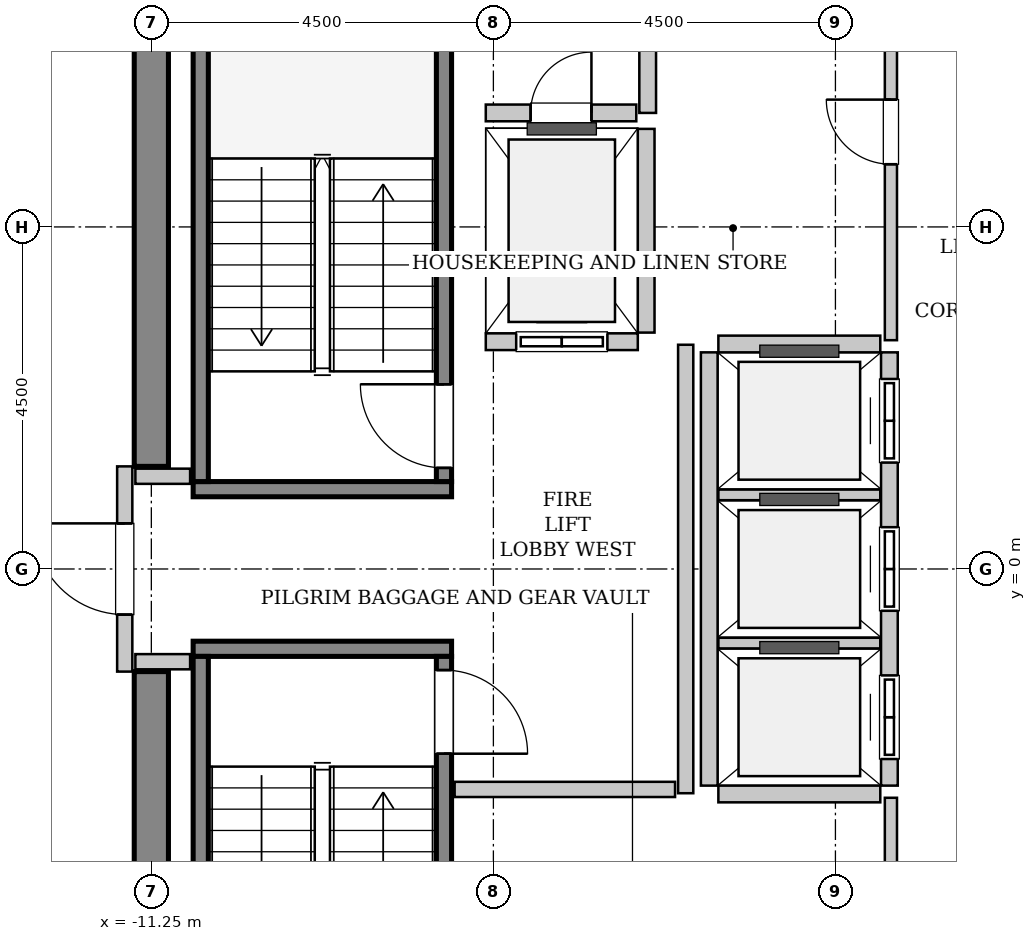
"""IFC4 building model, lengths in metres.
Left out: names, types, materials, properties, quantities, classifications, styles, units other than length and angle.
Written with IfcOpenShell. Run it as: python <this file> out.ifc"""

import sys

from ifc_helpers import new_model, si_unit, direction, frame, frame_2d, origin, place, context, subcontext, project, spatial, rectangle, extrude, source, transform, mapped, element, fill, save


model = new_model("IFC4")
c1 = context("Model", 3, precision=1e-05, world=origin(), true_north=direction((0.0, 1.0)))
c2 = subcontext(c1, "Body", "Model", "MODEL_VIEW")
j1 = project(units=[si_unit("LENGTHUNIT", "METRE"), si_unit("PLANEANGLEUNIT", "RADIAN")], contexts=[c1])
p1 = place(None, origin())
s1 = spatial("IfcSite", under=j1, at=p1, CompositionType="ELEMENT")
p2 = place(p1, origin())
s2 = spatial("IfcBuilding", under=s1, at=p2, CompositionType="ELEMENT")
p3 = place(p2, frame((0.0, 0.0, 302.6)))
s3 = spatial("IfcBuildingStorey", under=s2, at=p3, CompositionType="ELEMENT", Elevation=302.6)
m1 = source(origin(), c2, "Body", "SweptSolid", [
    extrude(rectangle(XDim=7.425, YDim=0.45, at=frame_2d((3.712, 0.0))), origin(), (0.0, 0.0, 1.0), 3.8),
])
for number, where, z_axis, x_axis in (
    (1, (-11.25, -8.775, 0.0), (0.0, 0.0, 1.0), (0.0, 1.0, 0.0)),
    (2, (-11.25, 1.35, 0.0), (0.0, 0.0, 1.0), (0.0, 1.0, 0.0)),
):
    element("IfcWall", number, at=place(p3, frame(where, z_axis=z_axis, x_axis=x_axis)), inside=s3, PredefinedType="SHEAR", context=c2, shape_type="MappedRepresentation", body=[
        mapped(m1, transform((0.0, 0.0, 0.0), x_axis=(1.0, 0.0, 0.0), y_axis=(0.0, 1.0, 0.0), z_axis=(0.0, 0.0, 1.0), scale=1.0)),
    ])
m2 = source(origin(), c2, "Body", "SweptSolid", [
    extrude(rectangle(XDim=3.4, YDim=0.2, at=frame_2d((1.7, 0.0))), origin(), (0.0, 0.0, 1.0), 3.8),
])
p4 = place(p3, frame((-7.3, 1.05, 0.0), z_axis=(0.0, 0.0, 1.0), x_axis=(-1.0, 0.0, 0.0)))
e3 = element("IfcWall", 3, at=p4, inside=s3, PredefinedType="SOLIDWALL", context=c2, shape_type="MappedRepresentation", body=[
    mapped(m2, transform((0.0, 0.0, 0.0), x_axis=(1.0, 0.0, 0.0), y_axis=(0.0, 1.0, 0.0), z_axis=(0.0, 0.0, 1.0), scale=1.0)),
])
m3 = source(origin(), c2, "Body", "SweptSolid", [
    extrude(rectangle(XDim=7.1, YDim=0.2, at=frame_2d((3.55, 0.0))), origin(), (0.0, 0.0, 1.0), 3.8),
])
p5 = place(p3, frame((-7.4, 1.15, 0.0), z_axis=(0.0, 0.0, 1.0), x_axis=(0.0, 1.0, 0.0)))
e4 = element("IfcWall", 4, at=p5, inside=s3, PredefinedType="SOLIDWALL", context=c2, shape_type="MappedRepresentation", body=[
    mapped(m3, transform((0.0, 0.0, 0.0), x_axis=(1.0, 0.0, 0.0), y_axis=(0.0, 1.0, 0.0), z_axis=(0.0, 0.0, 1.0), scale=1.0)),
])
p6 = place(p5, frame((0.18, 0.0, 0.0)))
e5 = element("IfcOpeningElement", 5, at=p6, cuts=e4, PredefinedType="OPENING", context=c2, shape_type="SweptSolid", body=[
    extrude(rectangle(XDim=1.1, YDim=2.15, at=frame_2d((0.55, 1.075))), frame((0.0, 0.11, 0.0), z_axis=(0.0, -1.0, 0.0), x_axis=(1.0, 0.0, 0.0)), (0.0, 0.0, 1.0), 0.22),
])
p7 = place(p3, frame((-10.6, 1.15, 0.0), z_axis=(0.0, 0.0, 1.0), x_axis=(0.0, 1.0, 0.0)))
e6 = element("IfcWall", 6, at=p7, inside=s3, PredefinedType="SOLIDWALL", context=c2, shape_type="MappedRepresentation", body=[
    mapped(m3, transform((0.0, 0.0, 0.0), x_axis=(1.0, 0.0, 0.0), y_axis=(0.0, 1.0, 0.0), z_axis=(0.0, 0.0, 1.0), scale=1.0)),
])
p8 = place(p3, frame((-10.7, -1.05, 0.0), z_axis=(0.0, 0.0, 1.0), x_axis=(1.0, 0.0, 0.0)))
e7 = element("IfcWall", 7, at=p8, inside=s3, PredefinedType="SOLIDWALL", context=c2, shape_type="MappedRepresentation", body=[
    mapped(m2, transform((0.0, 0.0, 0.0), x_axis=(1.0, 0.0, 0.0), y_axis=(0.0, 1.0, 0.0), z_axis=(0.0, 0.0, 1.0), scale=1.0)),
])
p9 = place(p3, frame((-10.6, -1.15, 0.0), z_axis=(0.0, 0.0, 1.0), x_axis=(0.0, -1.0, 0.0)))
e8 = element("IfcWall", 8, at=p9, inside=s3, PredefinedType="SOLIDWALL", context=c2, shape_type="MappedRepresentation", body=[
    mapped(m3, transform((0.0, 0.0, 0.0), x_axis=(1.0, 0.0, 0.0), y_axis=(0.0, 1.0, 0.0), z_axis=(0.0, 0.0, 1.0), scale=1.0)),
])
p10 = place(p3, frame((-7.4, -1.15, 0.0), z_axis=(0.0, 0.0, 1.0), x_axis=(0.0, -1.0, 0.0)))
e9 = element("IfcWall", 9, at=p10, inside=s3, PredefinedType="SOLIDWALL", context=c2, shape_type="MappedRepresentation", body=[
    mapped(m3, transform((0.0, 0.0, 0.0), x_axis=(1.0, 0.0, 0.0), y_axis=(0.0, 1.0, 0.0), z_axis=(0.0, 0.0, 1.0), scale=1.0)),
])
p11 = place(p10, frame((0.18, 0.0, 0.0)))
e10 = element("IfcOpeningElement", 10, at=p11, cuts=e9, PredefinedType="OPENING", context=c2, shape_type="SweptSolid", body=[
    extrude(rectangle(XDim=1.1, YDim=2.15, at=frame_2d((0.55, 1.075))), frame((0.0, 0.11, 0.0), z_axis=(0.0, -1.0, 0.0), x_axis=(1.0, 0.0, 0.0)), (0.0, 0.0, 1.0), 0.22),
])
m4 = source(origin(), c2, "Body", "SweptSolid", [
    extrude(rectangle(XDim=2.0, YDim=0.22, at=frame_2d((1.0, 0.0))), origin(), (0.0, 0.0, 1.0), 3.535),
])
p12 = place(p3, frame((-6.85, 2.99, 0.0), z_axis=(0.0, 0.0, 1.0), x_axis=(1.0, 0.0, 0.0)))
e11 = element("IfcWall", 11, at=p12, inside=s3, PredefinedType="SOLIDWALL", context=c2, shape_type="MappedRepresentation", body=[
    mapped(m4, transform((0.0, 0.0, 0.0), x_axis=(1.0, 0.0, 0.0), y_axis=(0.0, 1.0, 0.0), z_axis=(0.0, 0.0, 1.0), scale=1.0)),
])
p13 = place(p12, frame((0.4, 0.0, 0.0)))
e12 = element("IfcOpeningElement", 12, at=p13, cuts=e11, PredefinedType="OPENING", context=c2, shape_type="SweptSolid", body=[
    extrude(rectangle(XDim=1.2, YDim=2.2, at=frame_2d((0.6, 1.1))), frame((0.0, 0.12, 0.0), z_axis=(0.0, -1.0, 0.0), x_axis=(1.0, 0.0, 0.0)), (0.0, 0.0, 1.0), 0.24),
])
m5 = source(origin(), c2, "Body", "SweptSolid", [
    extrude(rectangle(XDim=2.68, YDim=0.22, at=frame_2d((1.34, 0.0))), origin(), (0.0, 0.0, 1.0), 3.535),
])
p14 = place(p3, frame((-4.74, 3.11, 0.0), z_axis=(0.0, 0.0, 1.0), x_axis=(0.0, 1.0, 0.0)))
e13 = element("IfcWall", 13, at=p14, inside=s3, PredefinedType="SOLIDWALL", context=c2, shape_type="MappedRepresentation", body=[
    mapped(m5, transform((0.0, 0.0, 0.0), x_axis=(1.0, 0.0, 0.0), y_axis=(0.0, 1.0, 0.0), z_axis=(0.0, 0.0, 1.0), scale=1.0)),
])
m6 = source(origin(), c2, "Body", "SweptSolid", [
    extrude(rectangle(XDim=5.7, YDim=0.22, at=frame_2d((2.85, 0.0))), origin(), (0.0, 0.0, 1.0), 3.535),
])
p15 = place(p3, frame((-1.54, -2.85, 0.0), z_axis=(0.0, 0.0, 1.0), x_axis=(0.0, 1.0, 0.0)))
e14 = element("IfcWall", 14, at=p15, inside=s3, PredefinedType="SOLIDWALL", context=c2, shape_type="MappedRepresentation", body=[
    mapped(m6, transform((0.0, 0.0, 0.0), x_axis=(1.0, 0.0, 0.0), y_axis=(0.0, 1.0, 0.0), z_axis=(0.0, 0.0, 1.0), scale=1.0)),
])
p16 = place(p15, frame((0.35, 0.0, 0.0)))
e15 = element("IfcOpeningElement", 15, at=p16, cuts=e14, PredefinedType="OPENING", context=c2, shape_type="SweptSolid", body=[
    extrude(rectangle(XDim=1.1, YDim=2.2, at=frame_2d((0.55, 1.1))), frame((0.0, 0.12, 0.0), z_axis=(0.0, -1.0, 0.0), x_axis=(1.0, 0.0, 0.0)), (0.0, 0.0, 1.0), 0.24),
])
p17 = place(p15, frame((2.3, 0.0, 0.0)))
e16 = element("IfcOpeningElement", 16, at=p17, cuts=e14, PredefinedType="OPENING", context=c2, shape_type="SweptSolid", body=[
    extrude(rectangle(XDim=1.1, YDim=2.2, at=frame_2d((0.55, 1.1))), frame((0.0, 0.12, 0.0), z_axis=(0.0, -1.0, 0.0), x_axis=(1.0, 0.0, 0.0)), (0.0, 0.0, 1.0), 0.24),
])
p18 = place(p15, frame((4.25, 0.0, 0.0)))
e17 = element("IfcOpeningElement", 17, at=p18, cuts=e14, PredefinedType="OPENING", context=c2, shape_type="SweptSolid", body=[
    extrude(rectangle(XDim=1.1, YDim=2.2, at=frame_2d((0.55, 1.1))), frame((0.0, 0.12, 0.0), z_axis=(0.0, -1.0, 0.0), x_axis=(1.0, 0.0, 0.0)), (0.0, 0.0, 1.0), 0.24),
])
p19 = place(p3, frame((-3.91, 2.85, 0.0), z_axis=(0.0, 0.0, 1.0), x_axis=(0.0, -1.0, 0.0)))
e18 = element("IfcWall", 18, at=p19, inside=s3, PredefinedType="SOLIDWALL", context=c2, shape_type="MappedRepresentation", body=[
    mapped(m6, transform((0.0, 0.0, 0.0), x_axis=(1.0, 0.0, 0.0), y_axis=(0.0, 1.0, 0.0), z_axis=(0.0, 0.0, 1.0), scale=1.0)),
])
m7 = source(origin(), c2, "Body", "SweptSolid", [
    extrude(rectangle(XDim=2.13, YDim=0.22, at=frame_2d((1.065, 0.0))), origin(), (0.0, 0.0, 1.0), 3.535),
])
p20 = place(p3, frame((-3.79, -2.96, 0.0), z_axis=(0.0, 0.0, 1.0), x_axis=(1.0, 0.0, 0.0)))
e19 = element("IfcWall", 19, at=p20, inside=s3, PredefinedType="SOLIDWALL", context=c2, shape_type="MappedRepresentation", body=[
    mapped(m7, transform((0.0, 0.0, 0.0), x_axis=(1.0, 0.0, 0.0), y_axis=(0.0, 1.0, 0.0), z_axis=(0.0, 0.0, 1.0), scale=1.0)),
])
m8 = source(origin(), c2, "Body", "SweptSolid", [
    extrude(rectangle(XDim=2.13, YDim=0.14, at=frame_2d((1.065, 0.0))), origin(), (0.0, 0.0, 1.0), 3.535),
])
for number, where, z_axis, x_axis in (
    (20, (-3.79, -0.975, 0.0), (0.0, 0.0, 1.0), (1.0, 0.0, 0.0)),
    (21, (-3.79, 0.975, 0.0), (0.0, 0.0, 1.0), (1.0, 0.0, 0.0)),
):
    element("IfcWall", number, at=place(p3, frame(where, z_axis=z_axis, x_axis=x_axis)), inside=s3, PredefinedType="PARTITIONING", context=c2, shape_type="MappedRepresentation", body=[
        mapped(m8, transform((0.0, 0.0, 0.0), x_axis=(1.0, 0.0, 0.0), y_axis=(0.0, 1.0, 0.0), z_axis=(0.0, 0.0, 1.0), scale=1.0)),
    ])
p21 = place(p3, frame((-1.66, 2.96, 0.0), z_axis=(0.0, 0.0, 1.0), x_axis=(-1.0, 0.0, 0.0)))
e22 = element("IfcWall", 22, at=p21, inside=s3, PredefinedType="SOLIDWALL", context=c2, shape_type="MappedRepresentation", body=[
    mapped(m7, transform((0.0, 0.0, 0.0), x_axis=(1.0, 0.0, 0.0), y_axis=(0.0, 1.0, 0.0), z_axis=(0.0, 0.0, 1.0), scale=1.0)),
])
m9 = source(origin(), c2, "Body", "SweptSolid", [
    extrude(rectangle(XDim=2.25, YDim=0.22, at=frame_2d((1.125, 0.0))), origin(), (0.0, 0.0, 1.0), 3.535),
])
p22 = place(p3, frame((-4.72, 6.0, 0.0), z_axis=(0.0, 0.0, 1.0), x_axis=(0.0, 1.0, 0.0)))
e23 = element("IfcWall", 23, at=p22, inside=s3, PredefinedType="SOLIDWALL", context=c2, shape_type="MappedRepresentation", body=[
    mapped(m9, transform((0.0, 0.0, 0.0), x_axis=(1.0, 0.0, 0.0), y_axis=(0.0, 1.0, 0.0), z_axis=(0.0, 0.0, 1.0), scale=1.0)),
])
m10 = source(origin(), c2, "Body", "SweptSolid", [
    extrude(rectangle(XDim=1.98, YDim=0.22, at=frame_2d((0.99, 0.0))), origin(), (0.0, 0.0, 1.0), 3.535),
])
p23 = place(p3, frame((-6.85, 6.0, 0.0), z_axis=(0.0, 0.0, 1.0), x_axis=(1.0, 0.0, 0.0)))
e24 = element("IfcWall", 24, at=p23, inside=s3, PredefinedType="SOLIDWALL", context=c2, shape_type="MappedRepresentation", body=[
    mapped(m10, transform((0.0, 0.0, 0.0), x_axis=(1.0, 0.0, 0.0), y_axis=(0.0, 1.0, 0.0), z_axis=(0.0, 0.0, 1.0), scale=1.0)),
])
p24 = place(p23, frame((0.59, 0.0, 0.0)))
e25 = element("IfcOpeningElement", 25, at=p24, cuts=e24, PredefinedType="OPENING", context=c2, shape_type="SweptSolid", body=[
    extrude(rectangle(XDim=0.8, YDim=2.0, at=frame_2d((0.4, 1.0))), frame((0.0, 0.12, 0.0), z_axis=(0.0, -1.0, 0.0), x_axis=(1.0, 0.0, 0.0)), (0.0, 0.0, 1.0), 0.24),
])
m11 = source(origin(), c2, "Body", "SweptSolid", [
    extrude(rectangle(XDim=2.7, YDim=0.2, at=frame_2d((1.35, 0.0))), origin(), (0.0, 0.0, 1.0), 2.625),
])
p25 = place(p3, frame((-11.6, -1.35, 0.0), z_axis=(0.0, 0.0, 1.0), x_axis=(0.0, 1.0, 0.0)))
e26 = element("IfcWall", 26, at=p25, inside=s3, PredefinedType="PARTITIONING", context=c2, shape_type="MappedRepresentation", body=[
    mapped(m11, transform((0.0, 0.0, 0.0), x_axis=(1.0, 0.0, 0.0), y_axis=(0.0, 1.0, 0.0), z_axis=(0.0, 0.0, 1.0), scale=1.0)),
])
p26 = place(p25, frame((0.75, 0.0, 0.0)))
e27 = element("IfcOpeningElement", 27, at=p26, cuts=e26, PredefinedType="OPENING", context=c2, shape_type="SweptSolid", body=[
    extrude(rectangle(XDim=1.2, YDim=2.15, at=frame_2d((0.6, 1.075))), frame((0.0, 0.11, 0.0), z_axis=(0.0, -1.0, 0.0), x_axis=(1.0, 0.0, 0.0)), (0.0, 0.0, 1.0), 0.22),
])
m12 = source(origin(), c2, "Body", "SweptSolid", [
    extrude(rectangle(XDim=5.9, YDim=0.2, at=frame_2d((2.95, 0.0))), origin(), (0.0, 0.0, 1.0), 3.535),
])
p27 = place(p3, frame((-4.22, -2.95, 0.0), z_axis=(0.0, 0.0, 1.0), x_axis=(0.0, 1.0, 0.0)))
e28 = element("IfcWall", 28, at=p27, inside=s3, PredefinedType="PARTITIONING", context=c2, shape_type="MappedRepresentation", body=[
    mapped(m12, transform((0.0, 0.0, 0.0), x_axis=(1.0, 0.0, 0.0), y_axis=(0.0, 1.0, 0.0), z_axis=(0.0, 0.0, 1.0), scale=1.0)),
])
m13 = source(origin(), c2, "Body", "SweptSolid", [
    extrude(rectangle(XDim=2.9, YDim=0.2, at=frame_2d((1.45, 0.0))), origin(), (0.0, 0.0, 1.0), 3.535),
])
p28 = place(p3, frame((-7.26, -2.9, 0.0), z_axis=(0.0, 0.0, 1.0), x_axis=(1.0, 0.0, 0.0)))
e29 = element("IfcWall", 29, at=p28, inside=s3, PredefinedType="PARTITIONING", context=c2, shape_type="MappedRepresentation", body=[
    mapped(m13, transform((0.0, 0.0, 0.0), x_axis=(1.0, 0.0, 0.0), y_axis=(0.0, 1.0, 0.0), z_axis=(0.0, 0.0, 1.0), scale=1.0)),
])
m14 = source(origin(), c2, "Body", "SweptSolid", [
    extrude(rectangle(XDim=0.72, YDim=0.2, at=frame_2d((0.36, 0.0))), origin(), (0.0, 0.0, 1.0), 3.535),
])
for number, where, z_axis, x_axis in (
    (30, (-11.46, 1.22, 0.0), (0.0, 0.0, 1.0), (1.0, 0.0, 0.0)),
    (31, (-11.46, -1.22, 0.0), (0.0, 0.0, 1.0), (1.0, 0.0, 0.0)),
):
    element("IfcWall", number, at=place(p3, frame(where, z_axis=z_axis, x_axis=x_axis)), inside=s3, PredefinedType="PARTITIONING", context=c2, shape_type="MappedRepresentation", body=[
        mapped(m14, transform((0.0, 0.0, 0.0), x_axis=(1.0, 0.0, 0.0), y_axis=(0.0, 1.0, 0.0), z_axis=(0.0, 0.0, 1.0), scale=1.0)),
    ])
m15 = source(origin(), c2, "Body", "SweptSolid", [
    extrude(rectangle(XDim=5.48, YDim=0.16, at=frame_2d((2.74, 0.0))), origin(), (0.0, 0.0, 1.0), 3.535),
])
p29 = place(p3, frame((-1.52, 3.01, 0.0), z_axis=(0.0, 0.0, 1.0), x_axis=(0.0, 1.0, 0.0)))
e32 = element("IfcWall", 32, at=p29, inside=s3, PredefinedType="PARTITIONING", context=c2, shape_type="MappedRepresentation", body=[
    mapped(m15, transform((0.0, 0.0, 0.0), x_axis=(1.0, 0.0, 0.0), y_axis=(0.0, 1.0, 0.0), z_axis=(0.0, 0.0, 1.0), scale=1.0)),
])
p30 = place(p29, frame((2.315, 0.0, 0.0)))
e33 = element("IfcOpeningElement", 33, at=p30, cuts=e32, PredefinedType="OPENING", context=c2, shape_type="SweptSolid", body=[
    extrude(rectangle(XDim=0.85, YDim=2.1, at=frame_2d((0.425, 1.05))), frame((0.0, 0.09, 0.0), z_axis=(0.0, -1.0, 0.0), x_axis=(1.0, 0.0, 0.0)), (0.0, 0.0, 1.0), 0.18),
])
p31 = place(p3, frame((-1.52, -8.49, 0.0), z_axis=(0.0, 0.0, 1.0), x_axis=(0.0, 1.0, 0.0)))
e34 = element("IfcWall", 34, at=p31, inside=s3, PredefinedType="PARTITIONING", context=c2, shape_type="MappedRepresentation", body=[
    mapped(m15, transform((0.0, 0.0, 0.0), x_axis=(1.0, 0.0, 0.0), y_axis=(0.0, 1.0, 0.0), z_axis=(0.0, 0.0, 1.0), scale=1.0)),
])
p32 = place(p31, frame((0.907, 0.0, 0.0)))
e35 = element("IfcOpeningElement", 35, at=p32, cuts=e34, PredefinedType="OPENING", context=c2, shape_type="SweptSolid", body=[
    extrude(rectangle(XDim=0.85, YDim=2.1, at=frame_2d((0.425, 1.05))), frame((0.0, 0.09, 0.0), z_axis=(0.0, -1.0, 0.0), x_axis=(1.0, 0.0, 0.0)), (0.0, 0.0, 1.0), 0.18),
])
p33 = place(p31, frame((3.615, 0.0, 0.0)))
e36 = element("IfcOpeningElement", 36, at=p33, cuts=e34, PredefinedType="OPENING", context=c2, shape_type="SweptSolid", body=[
    extrude(rectangle(XDim=0.85, YDim=2.1, at=frame_2d((0.425, 1.05))), frame((0.0, 0.09, 0.0), z_axis=(0.0, -1.0, 0.0), x_axis=(1.0, 0.0, 0.0)), (0.0, 0.0, 1.0), 0.18),
])
m16 = source(origin(), c2, "Body", "SweptSolid", [
    extrude(rectangle(XDim=1.1, YDim=2.15, at=frame_2d((0.55, 1.075))), frame((0.0, 0.025, 0.0), z_axis=(0.0, -1.0, 0.0), x_axis=(1.0, 0.0, 0.0)), (0.0, 0.0, 1.0), 0.05),
])
p34 = place(p6, origin())
e37 = element("IfcDoor", 37, at=p34, inside=s3, OperationType="SINGLE_SWING_RIGHT", PredefinedType="DOOR", context=c2, shape_type="MappedRepresentation", body=[
    mapped(m16, transform((0.0, 0.0, 0.0), x_axis=(1.0, 0.0, 0.0), y_axis=(0.0, 1.0, 0.0), z_axis=(0.0, 0.0, 1.0), scale=1.0)),
])
fill(e5, e37)
p35 = place(p11, origin())
e38 = element("IfcDoor", 38, at=p35, inside=s3, OperationType="SINGLE_SWING_RIGHT", PredefinedType="DOOR", context=c2, shape_type="MappedRepresentation", body=[
    mapped(m16, transform((0.0, 0.0, 0.0), x_axis=(1.0, 0.0, 0.0), y_axis=(0.0, 1.0, 0.0), z_axis=(0.0, 0.0, 1.0), scale=1.0)),
])
fill(e10, e38)
m17 = source(origin(), c2, "Body", "SweptSolid", [
    extrude(rectangle(XDim=1.2, YDim=2.2, at=frame_2d((0.6, 1.1))), frame((0.0, 0.025, 0.0), z_axis=(0.0, -1.0, 0.0), x_axis=(1.0, 0.0, 0.0)), (0.0, 0.0, 1.0), 0.05),
])
p36 = place(p13, origin())
e39 = element("IfcDoor", 39, at=p36, inside=s3, OperationType="SLIDING_TO_LEFT", PredefinedType="DOOR", context=c2, shape_type="MappedRepresentation", body=[
    mapped(m17, transform((0.0, 0.0, 0.0), x_axis=(1.0, 0.0, 0.0), y_axis=(0.0, 1.0, 0.0), z_axis=(0.0, 0.0, 1.0), scale=1.0)),
])
fill(e12, e39)
m18 = source(origin(), c2, "Body", "SweptSolid", [
    extrude(rectangle(XDim=1.1, YDim=2.2, at=frame_2d((0.55, 1.1))), frame((0.0, 0.025, 0.0), z_axis=(0.0, -1.0, 0.0), x_axis=(1.0, 0.0, 0.0)), (0.0, 0.0, 1.0), 0.05),
])
p37 = place(p16, origin())
e40 = element("IfcDoor", 40, at=p37, inside=s3, OperationType="DOUBLE_DOOR_SLIDING", PredefinedType="DOOR", context=c2, shape_type="MappedRepresentation", body=[
    mapped(m18, transform((0.0, 0.0, 0.0), x_axis=(1.0, 0.0, 0.0), y_axis=(0.0, 1.0, 0.0), z_axis=(0.0, 0.0, 1.0), scale=1.0)),
])
fill(e15, e40)
p38 = place(p17, origin())
e41 = element("IfcDoor", 41, at=p38, inside=s3, OperationType="DOUBLE_DOOR_SLIDING", PredefinedType="DOOR", context=c2, shape_type="MappedRepresentation", body=[
    mapped(m18, transform((0.0, 0.0, 0.0), x_axis=(1.0, 0.0, 0.0), y_axis=(0.0, 1.0, 0.0), z_axis=(0.0, 0.0, 1.0), scale=1.0)),
])
fill(e16, e41)
p39 = place(p18, origin())
e42 = element("IfcDoor", 42, at=p39, inside=s3, OperationType="DOUBLE_DOOR_SLIDING", PredefinedType="DOOR", context=c2, shape_type="MappedRepresentation", body=[
    mapped(m18, transform((0.0, 0.0, 0.0), x_axis=(1.0, 0.0, 0.0), y_axis=(0.0, 1.0, 0.0), z_axis=(0.0, 0.0, 1.0), scale=1.0)),
])
fill(e17, e42)
m19 = source(origin(), c2, "Body", "SweptSolid", [
    extrude(rectangle(XDim=0.8, YDim=2.0, at=frame_2d((0.4, 1.0))), frame((0.0, 0.025, 0.0), z_axis=(0.0, -1.0, 0.0), x_axis=(1.0, 0.0, 0.0)), (0.0, 0.0, 1.0), 0.05),
])
p40 = place(p24, origin())
e43 = element("IfcDoor", 43, at=p40, inside=s3, OperationType="SINGLE_SWING_RIGHT", PredefinedType="TRAPDOOR", context=c2, shape_type="MappedRepresentation", body=[
    mapped(m19, transform((0.0, 0.0, 0.0), x_axis=(1.0, 0.0, 0.0), y_axis=(0.0, 1.0, 0.0), z_axis=(0.0, 0.0, 1.0), scale=1.0)),
])
fill(e25, e43)
m20 = source(origin(), c2, "Body", "SweptSolid", [
    extrude(rectangle(XDim=1.2, YDim=2.15, at=frame_2d((0.6, 1.075))), frame((0.0, 0.025, 0.0), z_axis=(0.0, -1.0, 0.0), x_axis=(1.0, 0.0, 0.0)), (0.0, 0.0, 1.0), 0.05),
])
p41 = place(p26, origin())
e44 = element("IfcDoor", 44, at=p41, inside=s3, OperationType="SINGLE_SWING_RIGHT", PredefinedType="DOOR", context=c2, shape_type="MappedRepresentation", body=[
    mapped(m20, transform((0.0, 0.0, 0.0), x_axis=(1.0, 0.0, 0.0), y_axis=(0.0, 1.0, 0.0), z_axis=(0.0, 0.0, 1.0), scale=1.0)),
])
fill(e27, e44)
m21 = source(origin(), c2, "Body", "SweptSolid", [
    extrude(rectangle(XDim=0.85, YDim=2.1, at=frame_2d((0.425, 1.05))), frame((0.0, 0.025, 0.0), z_axis=(0.0, -1.0, 0.0), x_axis=(1.0, 0.0, 0.0)), (0.0, 0.0, 1.0), 0.05),
])
p42 = place(p30, origin())
e45 = element("IfcDoor", 45, at=p42, inside=s3, OperationType="SINGLE_SWING_RIGHT", PredefinedType="DOOR", context=c2, shape_type="MappedRepresentation", body=[
    mapped(m21, transform((0.0, 0.0, 0.0), x_axis=(1.0, 0.0, 0.0), y_axis=(0.0, 1.0, 0.0), z_axis=(0.0, 0.0, 1.0), scale=1.0)),
])
fill(e33, e45)
save(model, sys.argv[1])
